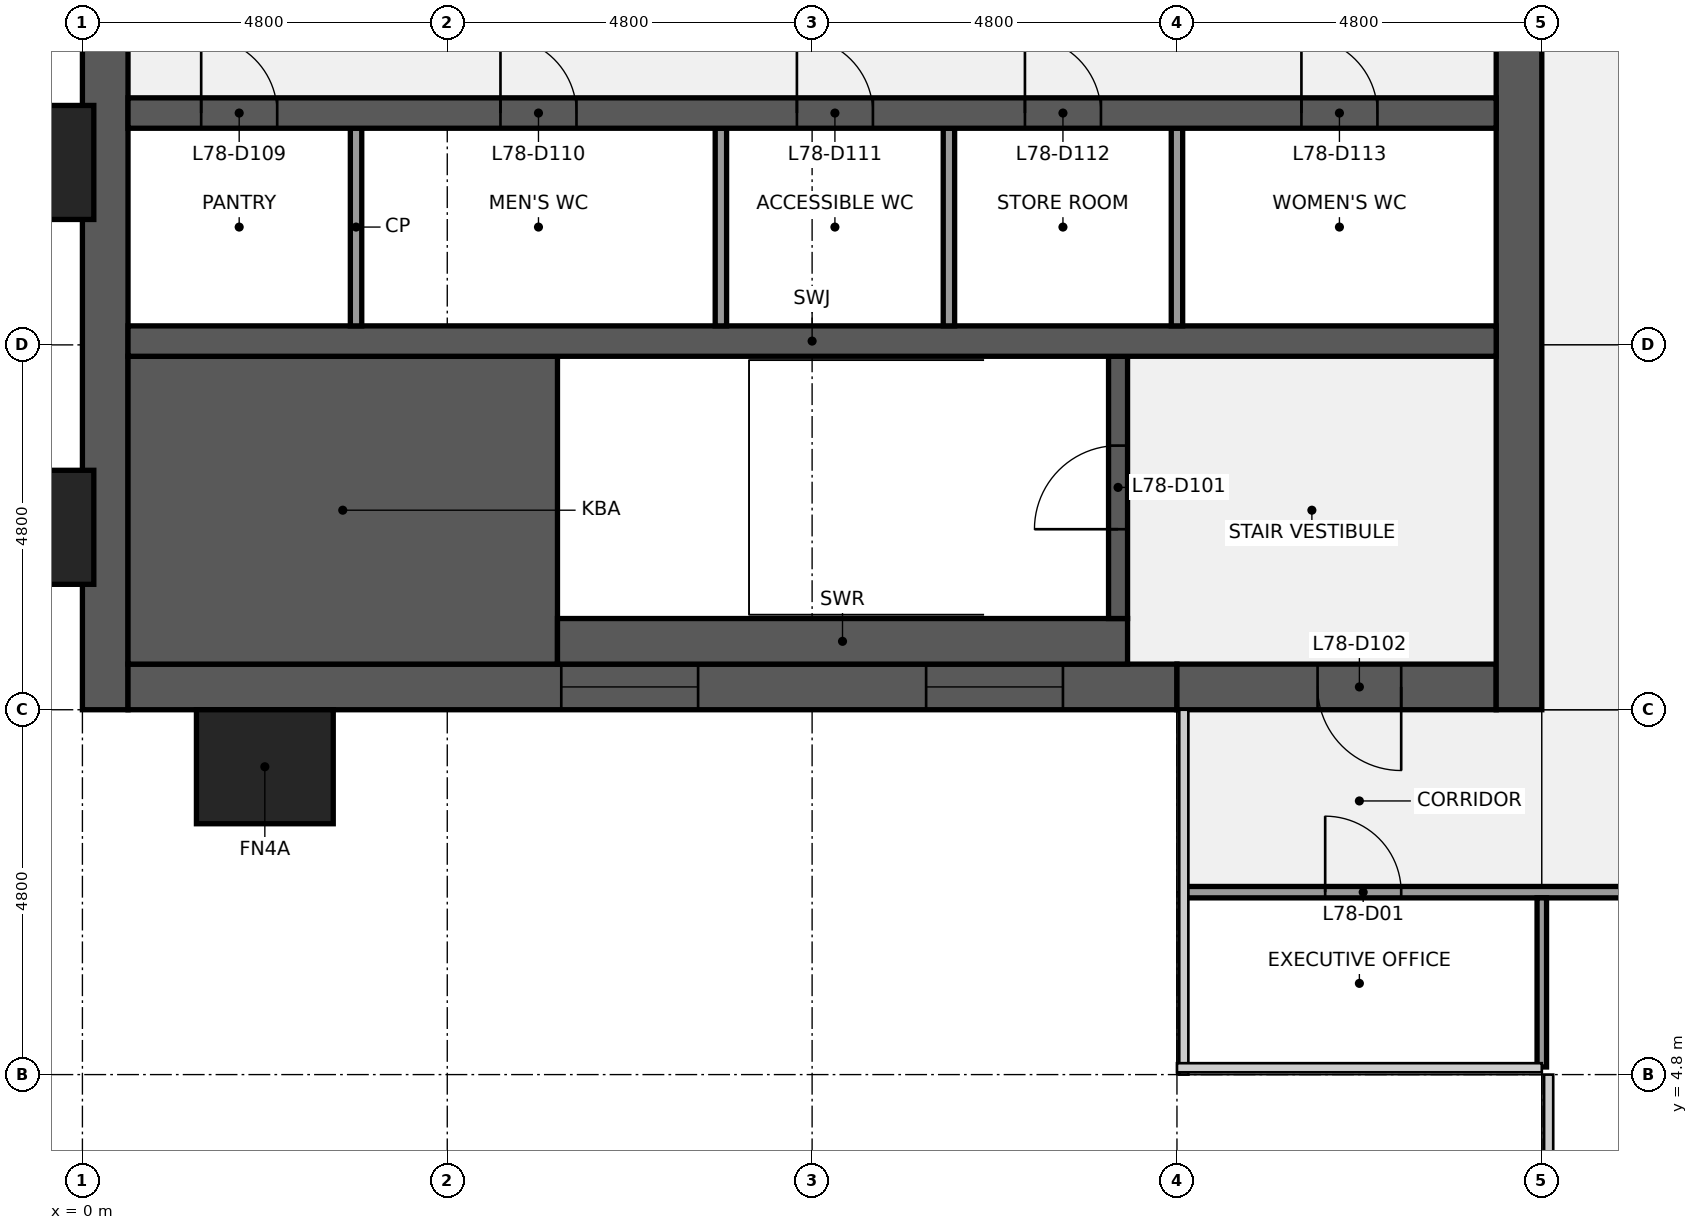
"""IFC4 building model, lengths in metres.
Left out: names, types, materials, properties, quantities, classifications, styles, units other than length and angle.
Written with IfcOpenShell. Run it as: python <this file> out.ifc"""

import sys

from ifc_helpers import new_model, si_unit, direction, frame, frame_2d, origin, origin_2d, place, context, subcontext, project, spatial, rectangle, extrude, element, fill, save


model = new_model("IFC4")
c1 = context("Model", 3, precision=1e-05, world=origin(), true_north=direction((0.0, 1.0)))
c2 = subcontext(c1, "Body", "Model", "MODEL_VIEW")
j1 = project(units=[si_unit("LENGTHUNIT", "METRE"), si_unit("PLANEANGLEUNIT", "RADIAN")], contexts=[c1])
p1 = place(None, origin())
s1 = spatial("IfcSite", under=j1, at=p1, CompositionType="ELEMENT")
p2 = place(p1, origin())
s2 = spatial("IfcBuilding", under=s1, at=p2, CompositionType="ELEMENT")
p3 = place(p2, frame((0.0, 0.0, 350.3)))
s3 = spatial("IfcBuildingStorey", under=s2, at=p3, CompositionType="ELEMENT", Elevation=350.3)
p4 = place(p3, frame((0.3, 9.6, 0.0), z_axis=(0.0, 0.0, 1.0), x_axis=(0.0, 1.0, 0.0)))
e1 = element("IfcWall", 1, at=p4, inside=s3, PredefinedType="SHEAR", context=c2, shape_type="SweptSolid", body=[
    extrude(rectangle(XDim=28.8, YDim=0.6, at=frame_2d((14.4, 0.0))), origin(), (0.0, 0.0, 1.0), 3.75),
])
p5 = place(p4, frame((8.85, 0.0, 0.9)))
e2 = element("IfcOpeningElement", 2, at=p5, cuts=e1, PredefinedType="OPENING", context=c2, shape_type="SweptSolid", body=[
    extrude(rectangle(XDim=1.5, YDim=1.5, at=frame_2d((0.75, 0.75))), frame((0.0, 0.31, 0.0), z_axis=(0.0, -1.0, 0.0), x_axis=(1.0, 0.0, 0.0)), (0.0, 0.0, 1.0), 0.62),
])
p6 = place(p4, frame((18.45, 0.0, 0.9)))
e3 = element("IfcOpeningElement", 3, at=p6, cuts=e1, PredefinedType="OPENING", context=c2, shape_type="SweptSolid", body=[
    extrude(rectangle(XDim=1.5, YDim=1.5, at=frame_2d((0.75, 0.75))), frame((0.0, 0.31, 0.0), z_axis=(0.0, -1.0, 0.0), x_axis=(1.0, 0.0, 0.0)), (0.0, 0.0, 1.0), 0.62),
])
p7 = place(p3, frame((14.4, 9.9, 0.0), z_axis=(0.0, 0.0, 1.0), x_axis=(-1.0, 0.0, 0.0)))
e4 = element("IfcWall", 4, at=p7, inside=s3, PredefinedType="SHEAR", context=c2, shape_type="SweptSolid", body=[
    extrude(rectangle(XDim=13.8, YDim=0.6, at=frame_2d((6.9, 0.0))), origin(), (0.0, 0.0, 1.0), 3.75),
])
p8 = place(p7, frame((6.3, 0.0, 0.9)))
e5 = element("IfcOpeningElement", 5, at=p8, cuts=e4, PredefinedType="OPENING", context=c2, shape_type="SweptSolid", body=[
    extrude(rectangle(XDim=1.8, YDim=1.5, at=frame_2d((0.9, 0.75))), frame((0.0, 0.31, 0.0), z_axis=(0.0, -1.0, 0.0), x_axis=(1.0, 0.0, 0.0)), (0.0, 0.0, 1.0), 0.62),
])
p9 = place(p7, frame((1.5, 0.0, 0.9)))
e6 = element("IfcOpeningElement", 6, at=p9, cuts=e4, PredefinedType="OPENING", context=c2, shape_type="SweptSolid", body=[
    extrude(rectangle(XDim=1.8, YDim=1.5, at=frame_2d((0.9, 0.75))), frame((0.0, 0.31, 0.0), z_axis=(0.0, -1.0, 0.0), x_axis=(1.0, 0.0, 0.0)), (0.0, 0.0, 1.0), 0.62),
])
p10 = place(p3, frame((18.6, 9.9, 0.0), z_axis=(0.0, 0.0, 1.0), x_axis=(-1.0, 0.0, 0.0)))
e7 = element("IfcWall", 7, at=p10, inside=s3, PredefinedType="SHEAR", context=c2, shape_type="SweptSolid", body=[
    extrude(rectangle(XDim=4.2, YDim=0.6, at=frame_2d((2.1, 0.0))), origin(), (0.0, 0.0, 1.0), 3.75),
])
p11 = place(p10, frame((1.25, 0.0, 0.0)))
e8 = element("IfcOpeningElement", 8, at=p11, cuts=e7, PredefinedType="OPENING", context=c2, shape_type="SweptSolid", body=[
    extrude(rectangle(XDim=1.1, YDim=2.1, at=frame_2d((0.55, 1.05))), frame((0.0, 0.31, 0.0), z_axis=(0.0, -1.0, 0.0), x_axis=(1.0, 0.0, 0.0)), (0.0, 0.0, 1.0), 0.62),
])
p12 = place(p3, frame((18.9, 38.4, 0.0), z_axis=(0.0, 0.0, 1.0), x_axis=(0.0, -1.0, 0.0)))
e9 = element("IfcWall", 9, at=p12, inside=s3, PredefinedType="SHEAR", context=c2, shape_type="SweptSolid", body=[
    extrude(rectangle(XDim=28.8, YDim=0.6, at=frame_2d((14.4, 0.0))), origin(), (0.0, 0.0, 1.0), 3.75),
])
p13 = place(p12, frame((18.3, 0.0, 0.0)))
e10 = element("IfcOpeningElement", 10, at=p13, cuts=e9, PredefinedType="OPENING", context=c2, shape_type="SweptSolid", body=[
    extrude(rectangle(XDim=1.8, YDim=2.1, at=frame_2d((0.9, 1.05))), frame((0.0, 0.31, 0.0), z_axis=(0.0, -1.0, 0.0), x_axis=(1.0, 0.0, 0.0)), (0.0, 0.0, 1.0), 0.62),
])
p14 = place(p12, frame((8.7, 0.0, 0.0)))
e11 = element("IfcOpeningElement", 11, at=p14, cuts=e9, PredefinedType="OPENING", context=c2, shape_type="SweptSolid", body=[
    extrude(rectangle(XDim=1.8, YDim=2.1, at=frame_2d((0.9, 1.05))), frame((0.0, 0.31, 0.0), z_axis=(0.0, -1.0, 0.0), x_axis=(1.0, 0.0, 0.0)), (0.0, 0.0, 1.0), 0.62),
])
p15 = place(p3, frame((0.6, 12.225, 0.0), z_axis=(0.0, 0.0, 1.0), x_axis=(1.0, 0.0, 0.0)))
e12 = element("IfcWall", 12, at=p15, inside=s3, PredefinedType="SHEAR", context=c2, shape_type="SweptSolid", body=[
    extrude(rectangle(XDim=5.65, YDim=4.05, at=frame_2d((2.825, 0.0))), origin(), (0.0, 0.0, 1.0), 3.75),
])
p16 = place(p3, frame((6.25, 10.5, 0.0), z_axis=(0.0, 0.0, 1.0), x_axis=(1.0, 0.0, 0.0)))
e13 = element("IfcWall", 13, at=p16, inside=s3, PredefinedType="SHEAR", context=c2, shape_type="SweptSolid", body=[
    extrude(rectangle(XDim=7.5, YDim=0.6, at=frame_2d((3.75, 0.0))), origin(), (0.0, 0.0, 1.0), 3.75),
])
p17 = place(p3, frame((13.625, 10.8, 0.0), z_axis=(0.0, 0.0, 1.0), x_axis=(0.0, 1.0, 0.0)))
e14 = element("IfcWall", 14, at=p17, inside=s3, PredefinedType="SHEAR", context=c2, shape_type="SweptSolid", body=[
    extrude(rectangle(XDim=3.45, YDim=0.25, at=frame_2d((1.725, 0.0))), origin(), (0.0, 0.0, 1.0), 3.75),
])
p18 = place(p17, frame((1.175, 0.0, 0.0)))
e15 = element("IfcOpeningElement", 15, at=p18, cuts=e14, PredefinedType="OPENING", context=c2, shape_type="SweptSolid", body=[
    extrude(rectangle(XDim=1.1, YDim=2.1, at=frame_2d((0.55, 1.05))), frame((0.0, 0.135, 0.0), z_axis=(0.0, -1.0, 0.0), x_axis=(1.0, 0.0, 0.0)), (0.0, 0.0, 1.0), 0.27),
])
p19 = place(p3, frame((0.6, 14.45, 0.0), z_axis=(0.0, 0.0, 1.0), x_axis=(1.0, 0.0, 0.0)))
e16 = element("IfcWall", 16, at=p19, inside=s3, PredefinedType="SHEAR", context=c2, shape_type="SweptSolid", body=[
    extrude(rectangle(XDim=18.0, YDim=0.4, at=frame_2d((9.0, 0.0))), origin(), (0.0, 0.0, 1.0), 3.75),
])
for number, where, z_axis, x_axis in (
    (17, (3.6, 14.65, 0.0), (0.0, 0.0, 1.0), (0.0, 1.0, 0.0)),
    (18, (8.4, 14.65, 0.0), (0.0, 0.0, 1.0), (0.0, 1.0, 0.0)),
    (19, (11.4, 14.65, 0.0), (0.0, 0.0, 1.0), (0.0, 1.0, 0.0)),
    (20, (14.4, 14.65, 0.0), (0.0, 0.0, 1.0), (0.0, 1.0, 0.0)),
):
    element("IfcWall", number, at=place(p3, frame(where, z_axis=z_axis, x_axis=x_axis)), inside=s3, PredefinedType="PARTITIONING", context=c2, shape_type="SweptSolid", body=[
        extrude(rectangle(XDim=2.6, YDim=0.15, at=frame_2d((1.3, 0.0))), origin(), (0.0, 0.0, 1.0), 3.75),
    ])
p20 = place(p3, frame((0.6, 17.45, 0.0), z_axis=(0.0, 0.0, 1.0), x_axis=(1.0, 0.0, 0.0)))
e21 = element("IfcWall", 21, at=p20, inside=s3, PredefinedType="SHEAR", context=c2, shape_type="SweptSolid", body=[
    extrude(rectangle(XDim=18.0, YDim=0.4, at=frame_2d((9.0, 0.0))), origin(), (0.0, 0.0, 1.0), 3.75),
])
p21 = place(p20, frame((0.962, 0.0, 0.0)))
e22 = element("IfcOpeningElement", 22, at=p21, cuts=e21, PredefinedType="OPENING", context=c2, shape_type="SweptSolid", body=[
    extrude(rectangle(XDim=1.0, YDim=2.1, at=frame_2d((0.5, 1.05))), frame((0.0, 0.21, 0.0), z_axis=(0.0, -1.0, 0.0), x_axis=(1.0, 0.0, 0.0)), (0.0, 0.0, 1.0), 0.42),
])
p22 = place(p20, frame((4.9, 0.0, 0.0)))
e23 = element("IfcOpeningElement", 23, at=p22, cuts=e21, PredefinedType="OPENING", context=c2, shape_type="SweptSolid", body=[
    extrude(rectangle(XDim=1.0, YDim=2.1, at=frame_2d((0.5, 1.05))), frame((0.0, 0.21, 0.0), z_axis=(0.0, -1.0, 0.0), x_axis=(1.0, 0.0, 0.0)), (0.0, 0.0, 1.0), 0.42),
])
p23 = place(p20, frame((8.8, 0.0, 0.0)))
e24 = element("IfcOpeningElement", 24, at=p23, cuts=e21, PredefinedType="OPENING", context=c2, shape_type="SweptSolid", body=[
    extrude(rectangle(XDim=1.0, YDim=2.1, at=frame_2d((0.5, 1.05))), frame((0.0, 0.21, 0.0), z_axis=(0.0, -1.0, 0.0), x_axis=(1.0, 0.0, 0.0)), (0.0, 0.0, 1.0), 0.42),
])
p24 = place(p20, frame((11.8, 0.0, 0.0)))
e25 = element("IfcOpeningElement", 25, at=p24, cuts=e21, PredefinedType="OPENING", context=c2, shape_type="SweptSolid", body=[
    extrude(rectangle(XDim=1.0, YDim=2.1, at=frame_2d((0.5, 1.05))), frame((0.0, 0.21, 0.0), z_axis=(0.0, -1.0, 0.0), x_axis=(1.0, 0.0, 0.0)), (0.0, 0.0, 1.0), 0.42),
])
p25 = place(p20, frame((15.438, 0.0, 0.0)))
e26 = element("IfcOpeningElement", 26, at=p25, cuts=e21, PredefinedType="OPENING", context=c2, shape_type="SweptSolid", body=[
    extrude(rectangle(XDim=1.0, YDim=2.1, at=frame_2d((0.5, 1.05))), frame((0.0, 0.21, 0.0), z_axis=(0.0, -1.0, 0.0), x_axis=(1.0, 0.0, 0.0)), (0.0, 0.0, 1.0), 0.42),
])
p26 = place(p3, frame((14.5, 7.2, 0.0), z_axis=(0.0, 0.0, 1.0), x_axis=(1.0, 0.0, 0.0)))
e27 = element("IfcWall", 27, at=p26, inside=s3, PredefinedType="PARTITIONING", context=c2, shape_type="SweptSolid", body=[
    extrude(rectangle(XDim=28.6, YDim=0.15, at=frame_2d((14.3, 0.0))), origin(), (0.0, 0.0, 1.0), 2.759),
])
p27 = place(p26, frame((1.85, 0.0, 0.0)))
e28 = element("IfcOpeningElement", 28, at=p27, cuts=e27, PredefinedType="OPENING", context=c2, shape_type="SweptSolid", body=[
    extrude(rectangle(XDim=1.0, YDim=2.1, at=frame_2d((0.5, 1.05))), frame((0.0, 0.085, 0.0), z_axis=(0.0, -1.0, 0.0), x_axis=(1.0, 0.0, 0.0)), (0.0, 0.0, 1.0), 0.17),
])
p28 = place(p26, frame((9.0, 0.0, 0.0)))
e29 = element("IfcOpeningElement", 29, at=p28, cuts=e27, PredefinedType="OPENING", context=c2, shape_type="SweptSolid", body=[
    extrude(rectangle(XDim=1.0, YDim=2.1, at=frame_2d((0.5, 1.05))), frame((0.0, 0.085, 0.0), z_axis=(0.0, -1.0, 0.0), x_axis=(1.0, 0.0, 0.0)), (0.0, 0.0, 1.0), 0.17),
])
p29 = place(p26, frame((15.0, 0.0, 0.0)))
e30 = element("IfcOpeningElement", 30, at=p29, cuts=e27, PredefinedType="OPENING", context=c2, shape_type="SweptSolid", body=[
    extrude(rectangle(XDim=1.0, YDim=2.1, at=frame_2d((0.5, 1.05))), frame((0.0, 0.085, 0.0), z_axis=(0.0, -1.0, 0.0), x_axis=(1.0, 0.0, 0.0)), (0.0, 0.0, 1.0), 0.17),
])
p30 = place(p26, frame((18.6, 0.0, 0.0)))
e31 = element("IfcOpeningElement", 31, at=p30, cuts=e27, PredefinedType="OPENING", context=c2, shape_type="SweptSolid", body=[
    extrude(rectangle(XDim=1.0, YDim=2.1, at=frame_2d((0.5, 1.05))), frame((0.0, 0.085, 0.0), z_axis=(0.0, -1.0, 0.0), x_axis=(1.0, 0.0, 0.0)), (0.0, 0.0, 1.0), 0.17),
])
p31 = place(p26, frame((24.6, 0.0, 0.0)))
e32 = element("IfcOpeningElement", 32, at=p31, cuts=e27, PredefinedType="OPENING", context=c2, shape_type="SweptSolid", body=[
    extrude(rectangle(XDim=1.0, YDim=2.1, at=frame_2d((0.5, 1.05))), frame((0.0, 0.085, 0.0), z_axis=(0.0, -1.0, 0.0), x_axis=(1.0, 0.0, 0.0)), (0.0, 0.0, 1.0), 0.17),
])
p32 = place(p3, frame((19.2, 4.9, 0.0), z_axis=(0.0, 0.0, 1.0), x_axis=(0.0, 1.0, 0.0)))
e33 = element("IfcWall", 33, at=p32, inside=s3, PredefinedType="PARTITIONING", context=c2, shape_type="SweptSolid", body=[
    extrude(rectangle(XDim=2.225, YDim=0.125, at=frame_2d((1.113, 0.0))), origin(), (0.0, 0.0, 1.0), 2.759),
])
for number, where, z_axis, x_axis in (
    (34, (-0.75, 12.0, 0.0), (0.0, 0.0, 1.0), (0.0, 1.0, 0.0)),
    (35, (-0.75, 16.8, 0.0), (0.0, 0.0, 1.0), (0.0, 1.0, 0.0)),
    (36, (2.4, 8.85, 0.0), (0.0, 0.0, 1.0), (1.0, 0.0, 0.0)),
):
    element("IfcColumn", number, at=place(p3, frame(where, z_axis=z_axis, x_axis=x_axis)), inside=s3, PredefinedType="PILASTER", context=c2, shape_type="SweptSolid", body=[
        extrude(rectangle(XDim=1.8, YDim=1.5, at=origin_2d()), origin(), (0.0, 0.0, 1.0), 4.0),
    ])
p33 = place(p18, origin())
e37 = element("IfcDoor", 37, at=p33, inside=s3, OperationType="SINGLE_SWING_LEFT", PredefinedType="DOOR", context=c2, shape_type="SweptSolid", body=[
    extrude(rectangle(XDim=1.1, YDim=2.1, at=frame_2d((0.55, 1.05))), frame((0.0, 0.025, 0.0), z_axis=(0.0, -1.0, 0.0), x_axis=(1.0, 0.0, 0.0)), (0.0, 0.0, 1.0), 0.05),
])
fill(e15, e37)
p34 = place(p11, origin())
e38 = element("IfcDoor", 38, at=p34, inside=s3, OperationType="SINGLE_SWING_LEFT", PredefinedType="DOOR", context=c2, shape_type="SweptSolid", body=[
    extrude(rectangle(XDim=1.1, YDim=2.1, at=frame_2d((0.55, 1.05))), frame((0.0, 0.025, 0.0), z_axis=(0.0, -1.0, 0.0), x_axis=(1.0, 0.0, 0.0)), (0.0, 0.0, 1.0), 0.05),
])
fill(e8, e38)
p35 = place(p21, origin())
e39 = element("IfcDoor", 39, at=p35, inside=s3, OperationType="SINGLE_SWING_LEFT", PredefinedType="DOOR", context=c2, shape_type="SweptSolid", body=[
    extrude(rectangle(XDim=1.0, YDim=2.1, at=frame_2d((0.5, 1.05))), frame((0.0, 0.025, 0.0), z_axis=(0.0, -1.0, 0.0), x_axis=(1.0, 0.0, 0.0)), (0.0, 0.0, 1.0), 0.05),
])
fill(e22, e39)
p36 = place(p22, origin())
e40 = element("IfcDoor", 40, at=p36, inside=s3, OperationType="SINGLE_SWING_LEFT", PredefinedType="DOOR", context=c2, shape_type="SweptSolid", body=[
    extrude(rectangle(XDim=1.0, YDim=2.1, at=frame_2d((0.5, 1.05))), frame((0.0, 0.025, 0.0), z_axis=(0.0, -1.0, 0.0), x_axis=(1.0, 0.0, 0.0)), (0.0, 0.0, 1.0), 0.05),
])
fill(e23, e40)
p37 = place(p23, origin())
e41 = element("IfcDoor", 41, at=p37, inside=s3, OperationType="SINGLE_SWING_LEFT", PredefinedType="DOOR", context=c2, shape_type="SweptSolid", body=[
    extrude(rectangle(XDim=1.0, YDim=2.1, at=frame_2d((0.5, 1.05))), frame((0.0, 0.025, 0.0), z_axis=(0.0, -1.0, 0.0), x_axis=(1.0, 0.0, 0.0)), (0.0, 0.0, 1.0), 0.05),
])
fill(e24, e41)
p38 = place(p24, origin())
e42 = element("IfcDoor", 42, at=p38, inside=s3, OperationType="SINGLE_SWING_LEFT", PredefinedType="DOOR", context=c2, shape_type="SweptSolid", body=[
    extrude(rectangle(XDim=1.0, YDim=2.1, at=frame_2d((0.5, 1.05))), frame((0.0, 0.025, 0.0), z_axis=(0.0, -1.0, 0.0), x_axis=(1.0, 0.0, 0.0)), (0.0, 0.0, 1.0), 0.05),
])
fill(e25, e42)
p39 = place(p25, origin())
e43 = element("IfcDoor", 43, at=p39, inside=s3, OperationType="SINGLE_SWING_LEFT", PredefinedType="DOOR", context=c2, shape_type="SweptSolid", body=[
    extrude(rectangle(XDim=1.0, YDim=2.1, at=frame_2d((0.5, 1.05))), frame((0.0, 0.025, 0.0), z_axis=(0.0, -1.0, 0.0), x_axis=(1.0, 0.0, 0.0)), (0.0, 0.0, 1.0), 0.05),
])
fill(e26, e43)
p40 = place(p8, origin())
e44 = element("IfcWindow", 44, at=p40, inside=s3, PartitioningType="SINGLE_PANEL", PredefinedType="WINDOW", context=c2, shape_type="SweptSolid", body=[
    extrude(rectangle(XDim=1.8, YDim=1.5, at=frame_2d((0.9, 0.75))), frame((0.0, 0.03, 0.0), z_axis=(0.0, -1.0, 0.0), x_axis=(1.0, 0.0, 0.0)), (0.0, 0.0, 1.0), 0.06),
])
fill(e5, e44)
p41 = place(p9, origin())
e45 = element("IfcWindow", 45, at=p41, inside=s3, PartitioningType="SINGLE_PANEL", PredefinedType="WINDOW", context=c2, shape_type="SweptSolid", body=[
    extrude(rectangle(XDim=1.8, YDim=1.5, at=frame_2d((0.9, 0.75))), frame((0.0, 0.03, 0.0), z_axis=(0.0, -1.0, 0.0), x_axis=(1.0, 0.0, 0.0)), (0.0, 0.0, 1.0), 0.06),
])
fill(e6, e45)
p42 = place(p27, origin())
e46 = element("IfcDoor", 46, at=p42, inside=s3, OperationType="SINGLE_SWING_LEFT", PredefinedType="DOOR", context=c2, shape_type="SweptSolid", body=[
    extrude(rectangle(XDim=1.0, YDim=2.1, at=frame_2d((0.5, 1.05))), frame((0.0, 0.025, 0.0), z_axis=(0.0, -1.0, 0.0), x_axis=(1.0, 0.0, 0.0)), (0.0, 0.0, 1.0), 0.05),
])
fill(e28, e46)
save(model, sys.argv[1])
